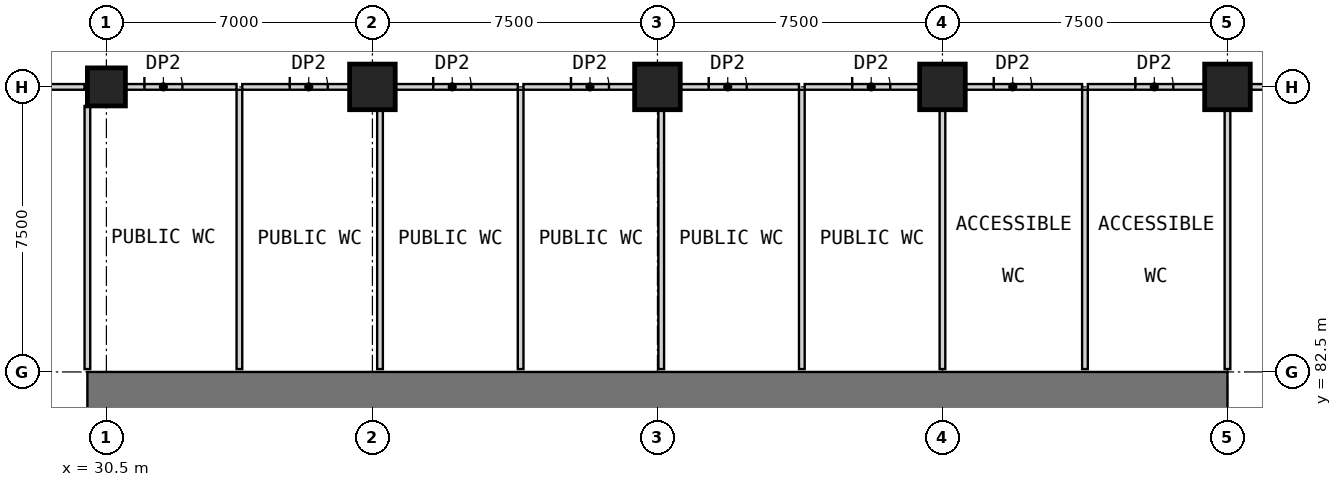
"""IFC4 building model, lengths in metres.
Left out: names, types, materials, properties, quantities, classifications, styles, units other than length and angle.
Written with IfcOpenShell. Run it as: python <this file> out.ifc"""

import sys

from ifc_helpers import new_model, si_unit, direction, frame, frame_2d, origin, origin_2d, place, context, subcontext, project, spatial, rectangle, extrude, element, fill, save


model = new_model("IFC4")
c1 = context("Model", 3, precision=1e-05, world=origin(), true_north=direction((0.0, 1.0)))
c2 = subcontext(c1, "Body", "Model", "MODEL_VIEW")
j1 = project(units=[si_unit("LENGTHUNIT", "METRE"), si_unit("PLANEANGLEUNIT", "RADIAN")], contexts=[c1])
p1 = place(None, origin())
s1 = spatial("IfcSite", under=j1, at=p1, CompositionType="ELEMENT")
p2 = place(p1, origin())
s2 = spatial("IfcBuilding", under=s1, at=p2, CompositionType="ELEMENT")
p3 = place(p2, frame((0.0, 0.0, 8.0)))
s3 = spatial("IfcBuildingStorey", under=s2, at=p3, CompositionType="ELEMENT", Elevation=8.0)
p4 = place(p3, frame((30.5, 90.0, 0.0), z_axis=(0.0, 0.0, 1.0), x_axis=(1.0, 0.0, 0.0)))
e1 = element("IfcColumn", 1, at=p4, inside=s3, PredefinedType="COLUMN", context=c2, shape_type="SweptSolid", body=[
    extrude(rectangle(XDim=1.0, YDim=1.0, at=origin_2d()), origin(), (0.0, 0.0, 1.0), 5.5),
])
for number, where, z_axis, x_axis in (
    (2, (37.5, 90.0, 0.0), (0.0, 0.0, 1.0), (1.0, 0.0, 0.0)),
    (3, (45.0, 90.0, 0.0), (0.0, 0.0, 1.0), (1.0, 0.0, 0.0)),
    (4, (52.5, 90.0, 0.0), (0.0, 0.0, 1.0), (1.0, 0.0, 0.0)),
    (5, (60.0, 90.0, 0.0), (0.0, 0.0, 1.0), (1.0, 0.0, 0.0)),
):
    element("IfcColumn", number, at=place(p3, frame(where, z_axis=z_axis, x_axis=x_axis)), inside=s3, PredefinedType="COLUMN", context=c2, shape_type="SweptSolid", body=[
        extrude(rectangle(XDim=1.2, YDim=1.2, at=origin_2d()), origin(), (0.0, 0.0, 1.0), 5.5),
    ])
p5 = place(p3, frame((30.0, 82.0, 0.0), z_axis=(0.0, 0.0, 1.0), x_axis=(1.0, 0.0, 0.0)))
e6 = element("IfcWall", 6, at=p5, inside=s3, PredefinedType="SHEAR", context=c2, shape_type="SweptSolid", body=[
    extrude(rectangle(XDim=30.0, YDim=1.0, at=frame_2d((15.0, 0.0))), origin(), (0.0, 0.0, 1.0), 5.5),
])
p6 = place(p3, frame((23.6, 90.0, 0.0), z_axis=(0.0, 0.0, 1.0), x_axis=(1.0, 0.0, 0.0)))
e7 = element("IfcWall", 7, at=p6, inside=s3, PredefinedType="PARTITIONING", context=c2, shape_type="SweptSolid", body=[
    extrude(rectangle(XDim=6.325, YDim=0.15, at=frame_2d((3.163, 0.0))), origin(), (0.0, 0.0, 1.0), 5.2),
])
p7 = place(p3, frame((31.0, 90.0, 0.0), z_axis=(0.0, 0.0, 1.0), x_axis=(1.0, 0.0, 0.0)))
e8 = element("IfcWall", 8, at=p7, inside=s3, PredefinedType="PARTITIONING", context=c2, shape_type="SweptSolid", body=[
    extrude(rectangle(XDim=2.925, YDim=0.15, at=frame_2d((1.462, 0.0))), origin(), (0.0, 0.0, 1.0), 5.2),
])
p8 = place(p7, frame((0.5, 0.0, 0.0)))
e9 = element("IfcOpeningElement", 9, at=p8, cuts=e8, PredefinedType="OPENING", context=c2, shape_type="SweptSolid", body=[
    extrude(rectangle(XDim=1.0, YDim=2.1, at=frame_2d((0.5, 1.05))), frame((0.0, 0.085, 0.0), z_axis=(0.0, -1.0, 0.0), x_axis=(1.0, 0.0, 0.0)), (0.0, 0.0, 1.0), 0.17),
])
p9 = place(p3, frame((34.075, 90.0, 0.0), z_axis=(0.0, 0.0, 1.0), x_axis=(1.0, 0.0, 0.0)))
e10 = element("IfcWall", 10, at=p9, inside=s3, PredefinedType="PARTITIONING", context=c2, shape_type="SweptSolid", body=[
    extrude(rectangle(XDim=2.825, YDim=0.15, at=frame_2d((1.413, 0.0))), origin(), (0.0, 0.0, 1.0), 5.2),
])
p10 = place(p9, frame((1.25, 0.0, 0.0)))
e11 = element("IfcOpeningElement", 11, at=p10, cuts=e10, PredefinedType="OPENING", context=c2, shape_type="SweptSolid", body=[
    extrude(rectangle(XDim=1.0, YDim=2.1, at=frame_2d((0.5, 1.05))), frame((0.0, 0.085, 0.0), z_axis=(0.0, -1.0, 0.0), x_axis=(1.0, 0.0, 0.0)), (0.0, 0.0, 1.0), 0.17),
])
p11 = place(p3, frame((38.1, 90.0, 0.0), z_axis=(0.0, 0.0, 1.0), x_axis=(1.0, 0.0, 0.0)))
e12 = element("IfcWall", 12, at=p11, inside=s3, PredefinedType="PARTITIONING", context=c2, shape_type="SweptSolid", body=[
    extrude(rectangle(XDim=3.225, YDim=0.15, at=frame_2d((1.612, 0.0))), origin(), (0.0, 0.0, 1.0), 5.2),
])
p12 = place(p11, frame((1.0, 0.0, 0.0)))
e13 = element("IfcOpeningElement", 13, at=p12, cuts=e12, PredefinedType="OPENING", context=c2, shape_type="SweptSolid", body=[
    extrude(rectangle(XDim=1.0, YDim=2.1, at=frame_2d((0.5, 1.05))), frame((0.0, 0.085, 0.0), z_axis=(0.0, -1.0, 0.0), x_axis=(1.0, 0.0, 0.0)), (0.0, 0.0, 1.0), 0.17),
])
p13 = place(p3, frame((41.475, 90.0, 0.0), z_axis=(0.0, 0.0, 1.0), x_axis=(1.0, 0.0, 0.0)))
e14 = element("IfcWall", 14, at=p13, inside=s3, PredefinedType="PARTITIONING", context=c2, shape_type="SweptSolid", body=[
    extrude(rectangle(XDim=2.925, YDim=0.15, at=frame_2d((1.462, 0.0))), origin(), (0.0, 0.0, 1.0), 5.2),
])
p14 = place(p13, frame((1.25, 0.0, 0.0)))
e15 = element("IfcOpeningElement", 15, at=p14, cuts=e14, PredefinedType="OPENING", context=c2, shape_type="SweptSolid", body=[
    extrude(rectangle(XDim=1.0, YDim=2.1, at=frame_2d((0.5, 1.05))), frame((0.0, 0.085, 0.0), z_axis=(0.0, -1.0, 0.0), x_axis=(1.0, 0.0, 0.0)), (0.0, 0.0, 1.0), 0.17),
])
p15 = place(p3, frame((45.6, 90.0, 0.0), z_axis=(0.0, 0.0, 1.0), x_axis=(1.0, 0.0, 0.0)))
e16 = element("IfcWall", 16, at=p15, inside=s3, PredefinedType="PARTITIONING", context=c2, shape_type="SweptSolid", body=[
    extrude(rectangle(XDim=3.125, YDim=0.15, at=frame_2d((1.562, 0.0))), origin(), (0.0, 0.0, 1.0), 5.2),
])
p16 = place(p15, frame((0.75, 0.0, 0.0)))
e17 = element("IfcOpeningElement", 17, at=p16, cuts=e16, PredefinedType="OPENING", context=c2, shape_type="SweptSolid", body=[
    extrude(rectangle(XDim=1.0, YDim=2.1, at=frame_2d((0.5, 1.05))), frame((0.0, 0.085, 0.0), z_axis=(0.0, -1.0, 0.0), x_axis=(1.0, 0.0, 0.0)), (0.0, 0.0, 1.0), 0.17),
])
p17 = place(p3, frame((48.875, 90.0, 0.0), z_axis=(0.0, 0.0, 1.0), x_axis=(1.0, 0.0, 0.0)))
e18 = element("IfcWall", 18, at=p17, inside=s3, PredefinedType="PARTITIONING", context=c2, shape_type="SweptSolid", body=[
    extrude(rectangle(XDim=3.025, YDim=0.15, at=frame_2d((1.512, 0.0))), origin(), (0.0, 0.0, 1.0), 5.2),
])
p18 = place(p17, frame((1.25, 0.0, 0.0)))
e19 = element("IfcOpeningElement", 19, at=p18, cuts=e18, PredefinedType="OPENING", context=c2, shape_type="SweptSolid", body=[
    extrude(rectangle(XDim=1.0, YDim=2.1, at=frame_2d((0.5, 1.05))), frame((0.0, 0.085, 0.0), z_axis=(0.0, -1.0, 0.0), x_axis=(1.0, 0.0, 0.0)), (0.0, 0.0, 1.0), 0.17),
])
p19 = place(p3, frame((53.1, 90.0, 0.0), z_axis=(0.0, 0.0, 1.0), x_axis=(1.0, 0.0, 0.0)))
e20 = element("IfcWall", 20, at=p19, inside=s3, PredefinedType="PARTITIONING", context=c2, shape_type="SweptSolid", body=[
    extrude(rectangle(XDim=3.075, YDim=0.15, at=frame_2d((1.538, 0.0))), origin(), (0.0, 0.0, 1.0), 5.2),
])
p20 = place(p19, frame((0.75, 0.0, 0.0)))
e21 = element("IfcOpeningElement", 21, at=p20, cuts=e20, PredefinedType="OPENING", context=c2, shape_type="SweptSolid", body=[
    extrude(rectangle(XDim=1.0, YDim=2.1, at=frame_2d((0.5, 1.05))), frame((0.0, 0.085, 0.0), z_axis=(0.0, -1.0, 0.0), x_axis=(1.0, 0.0, 0.0)), (0.0, 0.0, 1.0), 0.17),
])
p21 = place(p3, frame((56.325, 90.0, 0.0), z_axis=(0.0, 0.0, 1.0), x_axis=(1.0, 0.0, 0.0)))
e22 = element("IfcWall", 22, at=p21, inside=s3, PredefinedType="PARTITIONING", context=c2, shape_type="SweptSolid", body=[
    extrude(rectangle(XDim=3.075, YDim=0.15, at=frame_2d((1.538, 0.0))), origin(), (0.0, 0.0, 1.0), 5.2),
])
p22 = place(p21, frame((1.25, 0.0, 0.0)))
e23 = element("IfcOpeningElement", 23, at=p22, cuts=e22, PredefinedType="OPENING", context=c2, shape_type="SweptSolid", body=[
    extrude(rectangle(XDim=1.0, YDim=2.1, at=frame_2d((0.5, 1.05))), frame((0.0, 0.085, 0.0), z_axis=(0.0, -1.0, 0.0), x_axis=(1.0, 0.0, 0.0)), (0.0, 0.0, 1.0), 0.17),
])
p23 = place(p3, frame((60.6, 90.0, 0.0), z_axis=(0.0, 0.0, 1.0), x_axis=(1.0, 0.0, 0.0)))
e24 = element("IfcWall", 24, at=p23, inside=s3, PredefinedType="PARTITIONING", context=c2, shape_type="SweptSolid", body=[
    extrude(rectangle(XDim=6.3, YDim=0.15, at=frame_2d((3.15, 0.0))), origin(), (0.0, 0.0, 1.0), 5.2),
])
p24 = place(p23, frame((3.5, 0.0, 0.0)))
e25 = element("IfcOpeningElement", 25, at=p24, cuts=e24, PredefinedType="OPENING", context=c2, shape_type="SweptSolid", body=[
    extrude(rectangle(XDim=1.8, YDim=2.4, at=frame_2d((0.9, 1.2))), frame((0.0, 0.085, 0.0), z_axis=(0.0, -1.0, 0.0), x_axis=(1.0, 0.0, 0.0)), (0.0, 0.0, 1.0), 0.17),
])
p25 = place(p3, frame((34.0, 82.575, 0.0), z_axis=(0.0, 0.0, 1.0), x_axis=(0.0, 1.0, 0.0)))
e26 = element("IfcWall", 26, at=p25, inside=s3, PredefinedType="PARTITIONING", context=c2, shape_type="SweptSolid", body=[
    extrude(rectangle(XDim=7.35, YDim=0.15, at=frame_2d((3.675, 0.0))), origin(), (0.0, 0.0, 1.0), 5.2),
])
p26 = place(p3, frame((52.5, 82.575, 0.0), z_axis=(0.0, 0.0, 1.0), x_axis=(0.0, 1.0, 0.0)))
e27 = element("IfcWall", 27, at=p26, inside=s3, PredefinedType="PARTITIONING", context=c2, shape_type="SweptSolid", body=[
    extrude(rectangle(XDim=6.825, YDim=0.15, at=frame_2d((3.413, 0.0))), origin(), (0.0, 0.0, 1.0), 5.2),
])
p27 = place(p3, frame((30.0, 82.575, 0.0), z_axis=(0.0, 0.0, 1.0), x_axis=(0.0, 1.0, 0.0)))
e28 = element("IfcWall", 28, at=p27, inside=s3, PredefinedType="PARTITIONING", context=c2, shape_type="SweptSolid", body=[
    extrude(rectangle(XDim=6.925, YDim=0.15, at=frame_2d((3.462, 0.0))), origin(), (0.0, 0.0, 1.0), 5.2),
])
p28 = place(p3, frame((37.7, 82.575, 0.0), z_axis=(0.0, 0.0, 1.0), x_axis=(0.0, 1.0, 0.0)))
e29 = element("IfcWall", 29, at=p28, inside=s3, PredefinedType="PARTITIONING", context=c2, shape_type="SweptSolid", body=[
    extrude(rectangle(XDim=6.825, YDim=0.15, at=frame_2d((3.413, 0.0))), origin(), (0.0, 0.0, 1.0), 5.2),
])
p29 = place(p3, frame((41.4, 82.575, 0.0), z_axis=(0.0, 0.0, 1.0), x_axis=(0.0, 1.0, 0.0)))
e30 = element("IfcWall", 30, at=p29, inside=s3, PredefinedType="PARTITIONING", context=c2, shape_type="SweptSolid", body=[
    extrude(rectangle(XDim=7.35, YDim=0.15, at=frame_2d((3.675, 0.0))), origin(), (0.0, 0.0, 1.0), 5.2),
])
p30 = place(p3, frame((45.1, 82.575, 0.0), z_axis=(0.0, 0.0, 1.0), x_axis=(0.0, 1.0, 0.0)))
e31 = element("IfcWall", 31, at=p30, inside=s3, PredefinedType="PARTITIONING", context=c2, shape_type="SweptSolid", body=[
    extrude(rectangle(XDim=6.825, YDim=0.15, at=frame_2d((3.413, 0.0))), origin(), (0.0, 0.0, 1.0), 5.2),
])
for number, where, z_axis, x_axis in (
    (32, (48.8, 82.575, 0.0), (0.0, 0.0, 1.0), (0.0, 1.0, 0.0)),
    (33, (56.25, 82.575, 0.0), (0.0, 0.0, 1.0), (0.0, 1.0, 0.0)),
):
    element("IfcWall", number, at=place(p3, frame(where, z_axis=z_axis, x_axis=x_axis)), inside=s3, PredefinedType="PARTITIONING", context=c2, shape_type="SweptSolid", body=[
        extrude(rectangle(XDim=7.35, YDim=0.15, at=frame_2d((3.675, 0.0))), origin(), (0.0, 0.0, 1.0), 5.2),
    ])
p31 = place(p3, frame((60.0, 82.575, 0.0), z_axis=(0.0, 0.0, 1.0), x_axis=(0.0, 1.0, 0.0)))
e34 = element("IfcWall", 34, at=p31, inside=s3, PredefinedType="PARTITIONING", context=c2, shape_type="SweptSolid", body=[
    extrude(rectangle(XDim=6.825, YDim=0.15, at=frame_2d((3.413, 0.0))), origin(), (0.0, 0.0, 1.0), 5.2),
])
p32 = place(p8, origin())
e35 = element("IfcDoor", 35, at=p32, inside=s3, OperationType="SINGLE_SWING_LEFT", PredefinedType="DOOR", context=c2, shape_type="SweptSolid", body=[
    extrude(rectangle(XDim=1.0, YDim=2.1, at=frame_2d((0.5, 1.05))), frame((0.0, 0.025, 0.0), z_axis=(0.0, -1.0, 0.0), x_axis=(1.0, 0.0, 0.0)), (0.0, 0.0, 1.0), 0.05),
])
fill(e9, e35)
p33 = place(p10, origin())
e36 = element("IfcDoor", 36, at=p33, inside=s3, OperationType="SINGLE_SWING_LEFT", PredefinedType="DOOR", context=c2, shape_type="SweptSolid", body=[
    extrude(rectangle(XDim=1.0, YDim=2.1, at=frame_2d((0.5, 1.05))), frame((0.0, 0.025, 0.0), z_axis=(0.0, -1.0, 0.0), x_axis=(1.0, 0.0, 0.0)), (0.0, 0.0, 1.0), 0.05),
])
fill(e11, e36)
p34 = place(p12, origin())
e37 = element("IfcDoor", 37, at=p34, inside=s3, OperationType="SINGLE_SWING_LEFT", PredefinedType="DOOR", context=c2, shape_type="SweptSolid", body=[
    extrude(rectangle(XDim=1.0, YDim=2.1, at=frame_2d((0.5, 1.05))), frame((0.0, 0.025, 0.0), z_axis=(0.0, -1.0, 0.0), x_axis=(1.0, 0.0, 0.0)), (0.0, 0.0, 1.0), 0.05),
])
fill(e13, e37)
p35 = place(p14, origin())
e38 = element("IfcDoor", 38, at=p35, inside=s3, OperationType="SINGLE_SWING_LEFT", PredefinedType="DOOR", context=c2, shape_type="SweptSolid", body=[
    extrude(rectangle(XDim=1.0, YDim=2.1, at=frame_2d((0.5, 1.05))), frame((0.0, 0.025, 0.0), z_axis=(0.0, -1.0, 0.0), x_axis=(1.0, 0.0, 0.0)), (0.0, 0.0, 1.0), 0.05),
])
fill(e15, e38)
p36 = place(p16, origin())
e39 = element("IfcDoor", 39, at=p36, inside=s3, OperationType="SINGLE_SWING_LEFT", PredefinedType="DOOR", context=c2, shape_type="SweptSolid", body=[
    extrude(rectangle(XDim=1.0, YDim=2.1, at=frame_2d((0.5, 1.05))), frame((0.0, 0.025, 0.0), z_axis=(0.0, -1.0, 0.0), x_axis=(1.0, 0.0, 0.0)), (0.0, 0.0, 1.0), 0.05),
])
fill(e17, e39)
p37 = place(p18, origin())
e40 = element("IfcDoor", 40, at=p37, inside=s3, OperationType="SINGLE_SWING_LEFT", PredefinedType="DOOR", context=c2, shape_type="SweptSolid", body=[
    extrude(rectangle(XDim=1.0, YDim=2.1, at=frame_2d((0.5, 1.05))), frame((0.0, 0.025, 0.0), z_axis=(0.0, -1.0, 0.0), x_axis=(1.0, 0.0, 0.0)), (0.0, 0.0, 1.0), 0.05),
])
fill(e19, e40)
p38 = place(p20, origin())
e41 = element("IfcDoor", 41, at=p38, inside=s3, OperationType="SINGLE_SWING_LEFT", PredefinedType="DOOR", context=c2, shape_type="SweptSolid", body=[
    extrude(rectangle(XDim=1.0, YDim=2.1, at=frame_2d((0.5, 1.05))), frame((0.0, 0.025, 0.0), z_axis=(0.0, -1.0, 0.0), x_axis=(1.0, 0.0, 0.0)), (0.0, 0.0, 1.0), 0.05),
])
fill(e21, e41)
p39 = place(p22, origin())
e42 = element("IfcDoor", 42, at=p39, inside=s3, OperationType="SINGLE_SWING_LEFT", PredefinedType="DOOR", context=c2, shape_type="SweptSolid", body=[
    extrude(rectangle(XDim=1.0, YDim=2.1, at=frame_2d((0.5, 1.05))), frame((0.0, 0.025, 0.0), z_axis=(0.0, -1.0, 0.0), x_axis=(1.0, 0.0, 0.0)), (0.0, 0.0, 1.0), 0.05),
])
fill(e23, e42)
save(model, sys.argv[1])
